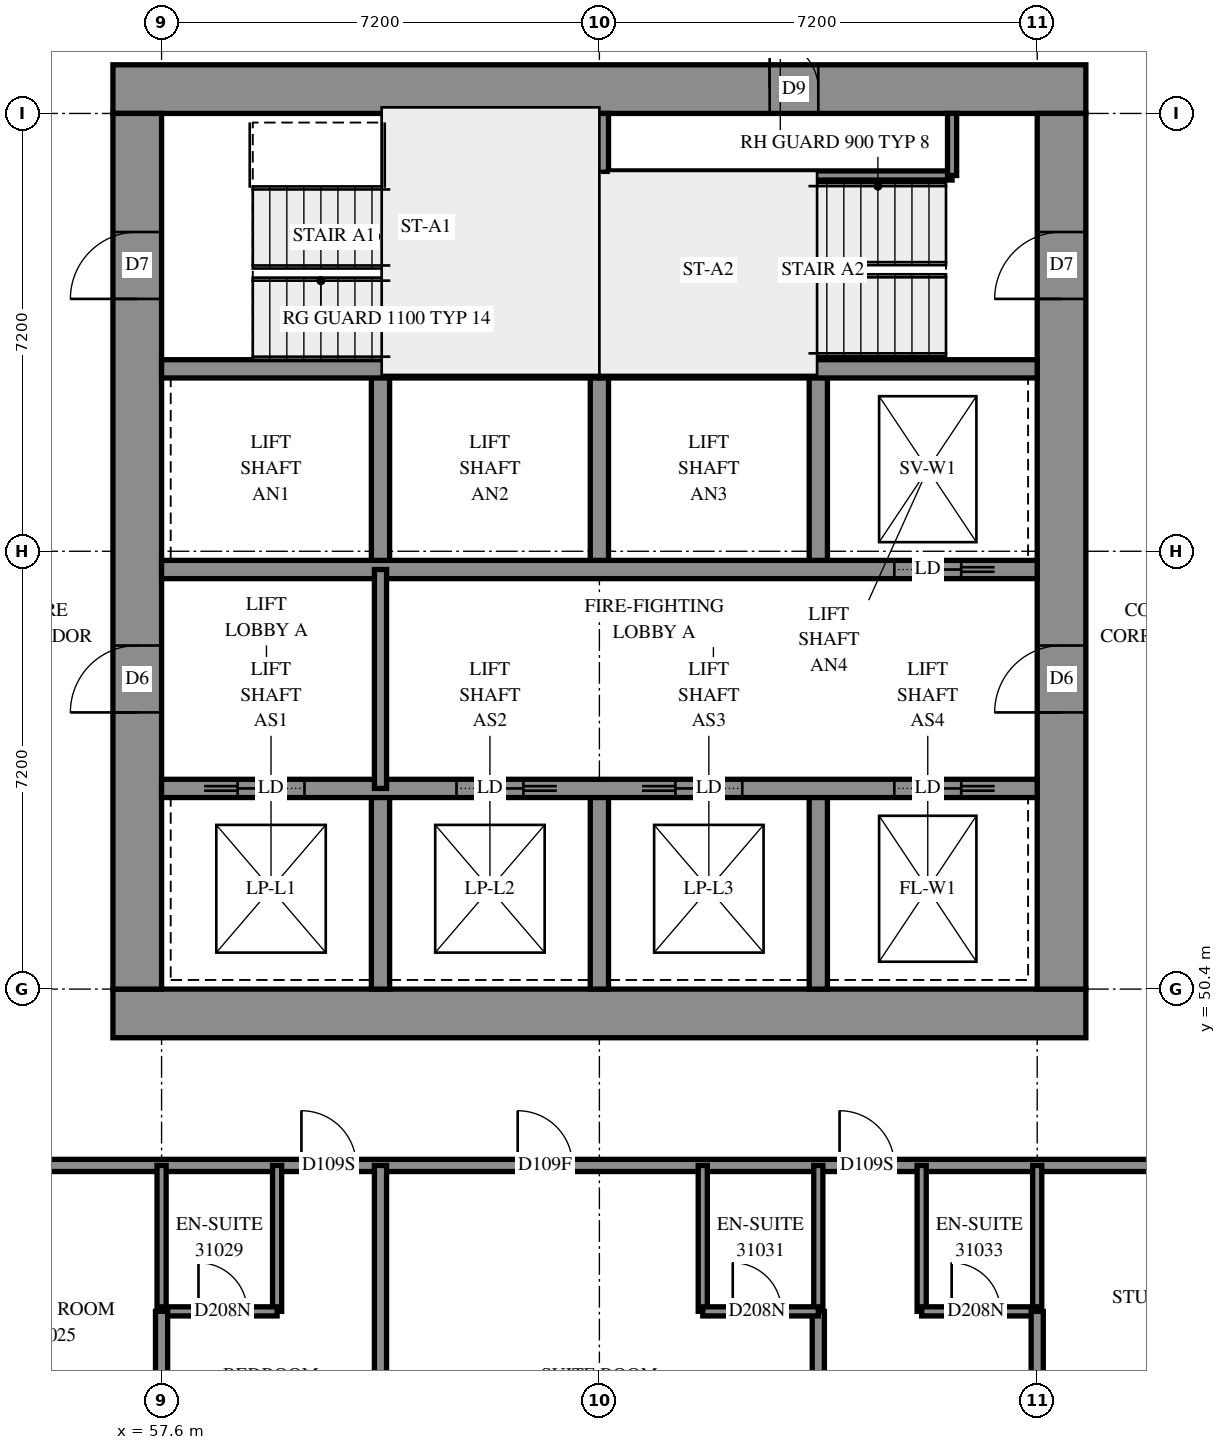
"""IFC4 building model, lengths in metres.
Left out: names, types, materials, properties, quantities, classifications, styles, units other than length and angle.
Written with IfcOpenShell. Run it as: python <this file> out.ifc"""

import sys

from ifc_helpers import new_model, si_unit, direction, frame, frame_2d, origin, place, context, subcontext, project, spatial, rectangle, extrude, element, fill, save


model = new_model("IFC4")
c1 = context("Model", 3, precision=1e-05, world=origin(), true_north=direction((0.0, 1.0)))
c2 = subcontext(c1, "Body", "Model", "MODEL_VIEW")
j1 = project(units=[si_unit("LENGTHUNIT", "METRE"), si_unit("PLANEANGLEUNIT", "RADIAN")], contexts=[c1])
p1 = place(None, origin())
s1 = spatial("IfcSite", under=j1, at=p1, CompositionType="ELEMENT")
p2 = place(p1, origin())
s2 = spatial("IfcBuilding", under=s1, at=p2, CompositionType="ELEMENT")
p3 = place(p2, frame((0.0, 0.0, 115.2)))
s3 = spatial("IfcBuildingStorey", under=s2, at=p3, CompositionType="ELEMENT", Elevation=115.2)
p4 = place(p3, frame((56.8, 50.0, -0.3), z_axis=(0.0, 0.0, 1.0), x_axis=(1.0, 0.0, 0.0)))
e1 = element("IfcWall", 1, at=p4, inside=s3, PredefinedType="SHEAR", context=c2, shape_type="SweptSolid", body=[
    extrude(rectangle(XDim=16.0, YDim=0.8, at=frame_2d((8.0, 0.0))), origin(), (0.0, 0.0, 1.0), 2.7),
])
p5 = place(p3, frame((56.8, 65.2, -0.3), z_axis=(0.0, 0.0, 1.0), x_axis=(1.0, 0.0, 0.0)))
e2 = element("IfcWall", 2, at=p5, inside=s3, PredefinedType="SHEAR", context=c2, shape_type="SweptSolid", body=[
    extrude(rectangle(XDim=16.0, YDim=0.8, at=frame_2d((8.0, 0.0))), origin(), (0.0, 0.0, 1.0), 2.7),
])
p6 = place(p5, frame((10.8, 0.0, 0.3)))
e3 = element("IfcOpeningElement", 3, at=p6, cuts=e2, PredefinedType="OPENING", context=c2, shape_type="SweptSolid", body=[
    extrude(rectangle(XDim=0.8, YDim=2.1, at=frame_2d((0.4, 1.05))), frame((0.0, 0.41, 0.0), z_axis=(0.0, -1.0, 0.0), x_axis=(1.0, 0.0, 0.0)), (0.0, 0.0, 1.0), 0.82),
])
p7 = place(p3, frame((57.2, 50.4, -0.3), z_axis=(0.0, 0.0, 1.0), x_axis=(0.0, 1.0, 0.0)))
e4 = element("IfcWall", 4, at=p7, inside=s3, PredefinedType="SHEAR", context=c2, shape_type="SweptSolid", body=[
    extrude(rectangle(XDim=14.4, YDim=0.8, at=frame_2d((7.2, 0.0))), origin(), (0.0, 0.0, 1.0), 2.7),
])
p8 = place(p7, frame((4.55, 0.0, 0.3)))
e5 = element("IfcOpeningElement", 5, at=p8, cuts=e4, PredefinedType="OPENING", context=c2, shape_type="SweptSolid", body=[
    extrude(rectangle(XDim=1.1, YDim=2.1, at=frame_2d((0.55, 1.05))), frame((0.0, 0.41, 0.0), z_axis=(0.0, -1.0, 0.0), x_axis=(1.0, 0.0, 0.0)), (0.0, 0.0, 1.0), 0.82),
])
p9 = place(p7, frame((11.35, 0.0, 0.3)))
e6 = element("IfcOpeningElement", 6, at=p9, cuts=e4, PredefinedType="OPENING", context=c2, shape_type="SweptSolid", body=[
    extrude(rectangle(XDim=1.1, YDim=2.1, at=frame_2d((0.55, 1.05))), frame((0.0, 0.41, 0.0), z_axis=(0.0, -1.0, 0.0), x_axis=(1.0, 0.0, 0.0)), (0.0, 0.0, 1.0), 0.82),
])
p10 = place(p3, frame((72.4, 50.4, -0.3), z_axis=(0.0, 0.0, 1.0), x_axis=(0.0, 1.0, 0.0)))
e7 = element("IfcWall", 7, at=p10, inside=s3, PredefinedType="SHEAR", context=c2, shape_type="SweptSolid", body=[
    extrude(rectangle(XDim=14.4, YDim=0.8, at=frame_2d((7.2, 0.0))), origin(), (0.0, 0.0, 1.0), 2.7),
])
p11 = place(p10, frame((4.55, 0.0, 0.3)))
e8 = element("IfcOpeningElement", 8, at=p11, cuts=e7, PredefinedType="OPENING", context=c2, shape_type="SweptSolid", body=[
    extrude(rectangle(XDim=1.1, YDim=2.1, at=frame_2d((0.55, 1.05))), frame((0.0, 0.41, 0.0), z_axis=(0.0, -1.0, 0.0), x_axis=(1.0, 0.0, 0.0)), (0.0, 0.0, 1.0), 0.82),
])
p12 = place(p10, frame((11.35, 0.0, 0.3)))
e9 = element("IfcOpeningElement", 9, at=p12, cuts=e7, PredefinedType="OPENING", context=c2, shape_type="SweptSolid", body=[
    extrude(rectangle(XDim=1.1, YDim=2.1, at=frame_2d((0.55, 1.05))), frame((0.0, 0.41, 0.0), z_axis=(0.0, -1.0, 0.0), x_axis=(1.0, 0.0, 0.0)), (0.0, 0.0, 1.0), 0.82),
])
for number, where, z_axis, x_axis in (
    (10, (61.2, 50.4, 0.0), (0.0, 0.0, 1.0), (0.0, 1.0, 0.0)),
    (11, (61.2, 57.3, 0.0), (0.0, 0.0, 1.0), (0.0, 1.0, 0.0)),
    (12, (64.8, 50.4, 0.0), (0.0, 0.0, 1.0), (0.0, 1.0, 0.0)),
    (13, (64.8, 57.3, 0.0), (0.0, 0.0, 1.0), (0.0, 1.0, 0.0)),
    (14, (68.4, 50.4, 0.0), (0.0, 0.0, 1.0), (0.0, 1.0, 0.0)),
    (15, (68.4, 57.3, 0.0), (0.0, 0.0, 1.0), (0.0, 1.0, 0.0)),
):
    element("IfcWall", number, at=place(p3, frame(where, z_axis=z_axis, x_axis=x_axis)), inside=s3, PredefinedType="SOLIDWALL", context=c2, shape_type="SweptSolid", body=[
        extrude(rectangle(XDim=3.3, YDim=0.3, at=frame_2d((1.65, 0.0))), origin(), (0.0, 0.0, 1.0), 3.1),
    ])
p13 = place(p3, frame((57.6, 53.7, 0.0), z_axis=(0.0, 0.0, 1.0), x_axis=(1.0, 0.0, 0.0)))
e16 = element("IfcWall", 16, at=p13, inside=s3, PredefinedType="SOLIDWALL", context=c2, shape_type="SweptSolid", body=[
    extrude(rectangle(XDim=14.4, YDim=0.3, at=frame_2d((7.2, 0.0))), origin(), (0.0, 0.0, 1.0), 3.1),
])
p14 = place(p13, frame((1.25, 0.0, 0.0)))
e17 = element("IfcOpeningElement", 17, at=p14, cuts=e16, PredefinedType="OPENING", context=c2, shape_type="SweptSolid", body=[
    extrude(rectangle(XDim=1.1, YDim=2.1, at=frame_2d((0.55, 1.05))), frame((0.0, 0.16, 0.0), z_axis=(0.0, -1.0, 0.0), x_axis=(1.0, 0.0, 0.0)), (0.0, 0.0, 1.0), 0.32),
])
p15 = place(p13, frame((4.85, 0.0, 0.0)))
e18 = element("IfcOpeningElement", 18, at=p15, cuts=e16, PredefinedType="OPENING", context=c2, shape_type="SweptSolid", body=[
    extrude(rectangle(XDim=1.1, YDim=2.1, at=frame_2d((0.55, 1.05))), frame((0.0, 0.16, 0.0), z_axis=(0.0, -1.0, 0.0), x_axis=(1.0, 0.0, 0.0)), (0.0, 0.0, 1.0), 0.32),
])
p16 = place(p13, frame((8.45, 0.0, 0.0)))
e19 = element("IfcOpeningElement", 19, at=p16, cuts=e16, PredefinedType="OPENING", context=c2, shape_type="SweptSolid", body=[
    extrude(rectangle(XDim=1.1, YDim=2.1, at=frame_2d((0.55, 1.05))), frame((0.0, 0.16, 0.0), z_axis=(0.0, -1.0, 0.0), x_axis=(1.0, 0.0, 0.0)), (0.0, 0.0, 1.0), 0.32),
])
p17 = place(p13, frame((12.05, 0.0, 0.0)))
e20 = element("IfcOpeningElement", 20, at=p17, cuts=e16, PredefinedType="OPENING", context=c2, shape_type="SweptSolid", body=[
    extrude(rectangle(XDim=1.1, YDim=2.1, at=frame_2d((0.55, 1.05))), frame((0.0, 0.16, 0.0), z_axis=(0.0, -1.0, 0.0), x_axis=(1.0, 0.0, 0.0)), (0.0, 0.0, 1.0), 0.32),
])
p18 = place(p3, frame((57.6, 57.3, 0.0), z_axis=(0.0, 0.0, 1.0), x_axis=(1.0, 0.0, 0.0)))
e21 = element("IfcWall", 21, at=p18, inside=s3, PredefinedType="SOLIDWALL", context=c2, shape_type="SweptSolid", body=[
    extrude(rectangle(XDim=14.4, YDim=0.3, at=frame_2d((7.2, 0.0))), origin(), (0.0, 0.0, 1.0), 3.1),
])
p19 = place(p18, frame((12.05, 0.0, 0.0)))
e22 = element("IfcOpeningElement", 22, at=p19, cuts=e21, PredefinedType="OPENING", context=c2, shape_type="SweptSolid", body=[
    extrude(rectangle(XDim=1.1, YDim=2.1, at=frame_2d((0.55, 1.05))), frame((0.0, 0.16, 0.0), z_axis=(0.0, -1.0, 0.0), x_axis=(1.0, 0.0, 0.0)), (0.0, 0.0, 1.0), 0.32),
])
for number, where, z_axis, x_axis in (
    (23, (57.6, 60.6, 0.0), (0.0, 0.0, 1.0), (1.0, 0.0, 0.0)),
    (24, (64.8, 60.6, 0.0), (0.0, 0.0, 1.0), (1.0, 0.0, 0.0)),
):
    element("IfcWall", number, at=place(p3, frame(where, z_axis=z_axis, x_axis=x_axis)), inside=s3, PredefinedType="SOLIDWALL", context=c2, shape_type="SweptSolid", body=[
        extrude(rectangle(XDim=7.2, YDim=0.3, at=frame_2d((3.6, 0.0))), origin(), (0.0, 0.0, 1.0), 3.1),
    ])
p20 = place(p3, frame((64.8, 60.6, 0.0), z_axis=(0.0, 0.0, 1.0), x_axis=(0.0, 1.0, 0.0)))
e25 = element("IfcWall", 25, at=p20, inside=s3, PredefinedType="SOLIDWALL", context=c2, shape_type="SweptSolid", body=[
    extrude(rectangle(XDim=4.2, YDim=0.3, at=frame_2d((2.1, 0.0))), origin(), (0.0, 0.0, 1.0), 3.1),
])
p21 = place(p3, frame((64.95, 63.78, 0.0), z_axis=(0.0, 0.0, 1.0), x_axis=(1.0, 0.0, 0.0)))
e26 = element("IfcWall", 26, at=p21, inside=s3, PredefinedType="PARTITIONING", context=c2, shape_type="SweptSolid", body=[
    extrude(rectangle(XDim=5.65, YDim=0.15, at=frame_2d((2.825, 0.0))), origin(), (0.0, 0.0, 1.0), 3.1),
])
p22 = place(p3, frame((70.6, 63.78, 0.0), z_axis=(0.0, 0.0, 1.0), x_axis=(0.0, 1.0, 0.0)))
e27 = element("IfcWall", 27, at=p22, inside=s3, PredefinedType="PARTITIONING", context=c2, shape_type="SweptSolid", body=[
    extrude(rectangle(XDim=1.02, YDim=0.15, at=frame_2d((0.51, 0.0))), origin(), (0.0, 0.0, 1.0), 3.1),
])
p23 = place(p3, frame((61.2, 53.7, 0.0), z_axis=(0.0, 0.0, 1.0), x_axis=(0.0, 1.0, 0.0)))
e28 = element("IfcWall", 28, at=p23, inside=s3, PredefinedType="PARTITIONING", context=c2, shape_type="SweptSolid", body=[
    extrude(rectangle(XDim=3.6, YDim=0.2, at=frame_2d((1.8, 0.0))), origin(), (0.0, 0.0, 1.0), 3.1),
])
p24 = place(p3, frame((54.7, 47.5, 0.0), z_axis=(0.0, 0.0, 1.0), x_axis=(1.0, 0.0, 0.0)))
e29 = element("IfcWall", 29, at=p24, inside=s3, PredefinedType="PARTITIONING", context=c2, shape_type="SweptSolid", body=[
    extrude(rectangle(XDim=19.442, YDim=0.2, at=frame_2d((9.721, 0.0))), origin(), (0.0, 0.0, 1.0), 3.1),
])
p25 = place(p24, frame((5.2, 0.0, 0.0)))
e30 = element("IfcOpeningElement", 30, at=p25, cuts=e29, PredefinedType="OPENING", context=c2, shape_type="SweptSolid", body=[
    extrude(rectangle(XDim=0.9, YDim=2.1, at=frame_2d((0.45, 1.05))), frame((0.0, 0.11, 0.0), z_axis=(0.0, -1.0, 0.0), x_axis=(1.0, 0.0, 0.0)), (0.0, 0.0, 1.0), 0.22),
])
p26 = place(p24, frame((8.757, 0.0, 0.0)))
e31 = element("IfcOpeningElement", 31, at=p26, cuts=e29, PredefinedType="OPENING", context=c2, shape_type="SweptSolid", body=[
    extrude(rectangle(XDim=0.9, YDim=2.1, at=frame_2d((0.45, 1.05))), frame((0.0, 0.11, 0.0), z_axis=(0.0, -1.0, 0.0), x_axis=(1.0, 0.0, 0.0)), (0.0, 0.0, 1.0), 0.22),
])
p27 = place(p24, frame((14.05, 0.0, 0.0)))
e32 = element("IfcOpeningElement", 32, at=p27, cuts=e29, PredefinedType="OPENING", context=c2, shape_type="SweptSolid", body=[
    extrude(rectangle(XDim=0.9, YDim=2.1, at=frame_2d((0.45, 1.05))), frame((0.0, 0.11, 0.0), z_axis=(0.0, -1.0, 0.0), x_axis=(1.0, 0.0, 0.0)), (0.0, 0.0, 1.0), 0.22),
])
p28 = place(p3, frame((61.2, 42.244, 0.0), z_axis=(0.0, 0.0, 1.0), x_axis=(0.0, 1.0, 0.0)))
e33 = element("IfcWall", 33, at=p28, inside=s3, PredefinedType="PARTITIONING", context=c2, shape_type="SweptSolid", body=[
    extrude(rectangle(XDim=5.256, YDim=0.2, at=frame_2d((2.628, 0.0))), origin(), (0.0, 0.0, 1.0), 3.1),
])
p29 = place(p3, frame((68.4, 42.176, 0.0), z_axis=(0.0, 0.0, 1.0), x_axis=(0.0, 1.0, 0.0)))
e34 = element("IfcWall", 34, at=p29, inside=s3, PredefinedType="PARTITIONING", context=c2, shape_type="SweptSolid", body=[
    extrude(rectangle(XDim=2.924, YDim=0.2, at=frame_2d((1.462, 0.0))), origin(), (0.0, 0.0, 1.0), 3.1),
])
for number, where, z_axis, x_axis in (
    (35, (59.5, 45.1, 0.0), (0.0, 0.0, 1.0), (0.0, 1.0, 0.0)),
    (36, (57.6, 45.1, 0.0), (0.0, 0.0, 1.0), (0.0, 1.0, 0.0)),
    (37, (66.5, 45.1, 0.0), (0.0, 0.0, 1.0), (0.0, 1.0, 0.0)),
    (38, (68.4, 45.1, 0.0), (0.0, 0.0, 1.0), (0.0, 1.0, 0.0)),
    (39, (70.1, 45.1, 0.0), (0.0, 0.0, 1.0), (0.0, 1.0, 0.0)),
    (40, (72.0, 45.1, 0.0), (0.0, 0.0, 1.0), (0.0, 1.0, 0.0)),
):
    element("IfcWall", number, at=place(p3, frame(where, z_axis=z_axis, x_axis=x_axis)), inside=s3, PredefinedType="PARTITIONING", context=c2, shape_type="SweptSolid", body=[
        extrude(rectangle(XDim=2.4, YDim=0.15, at=frame_2d((1.2, 0.0))), origin(), (0.0, 0.0, 1.0), 3.1),
    ])
p30 = place(p3, frame((66.5, 45.1, 0.0), z_axis=(0.0, 0.0, 1.0), x_axis=(1.0, 0.0, 0.0)))
e41 = element("IfcWall", 41, at=p30, inside=s3, PredefinedType="PARTITIONING", context=c2, shape_type="SweptSolid", body=[
    extrude(rectangle(XDim=1.9, YDim=0.15, at=frame_2d((0.95, 0.0))), origin(), (0.0, 0.0, 1.0), 3.1),
])
p31 = place(p30, frame((0.493, 0.0, 0.0)))
e42 = element("IfcOpeningElement", 42, at=p31, cuts=e41, PredefinedType="OPENING", context=c2, shape_type="SweptSolid", body=[
    extrude(rectangle(XDim=0.8, YDim=2.1, at=frame_2d((0.4, 1.05))), frame((0.0, 0.085, 0.0), z_axis=(0.0, -1.0, 0.0), x_axis=(1.0, 0.0, 0.0)), (0.0, 0.0, 1.0), 0.17),
])
p32 = place(p3, frame((70.1, 45.1, 0.0), z_axis=(0.0, 0.0, 1.0), x_axis=(1.0, 0.0, 0.0)))
e43 = element("IfcWall", 43, at=p32, inside=s3, PredefinedType="PARTITIONING", context=c2, shape_type="SweptSolid", body=[
    extrude(rectangle(XDim=1.9, YDim=0.15, at=frame_2d((0.95, 0.0))), origin(), (0.0, 0.0, 1.0), 3.1),
])
p33 = place(p32, frame((0.493, 0.0, 0.0)))
e44 = element("IfcOpeningElement", 44, at=p33, cuts=e43, PredefinedType="OPENING", context=c2, shape_type="SweptSolid", body=[
    extrude(rectangle(XDim=0.8, YDim=2.1, at=frame_2d((0.4, 1.05))), frame((0.0, 0.085, 0.0), z_axis=(0.0, -1.0, 0.0), x_axis=(1.0, 0.0, 0.0)), (0.0, 0.0, 1.0), 0.17),
])
p34 = place(p3, frame((57.6, 45.1, 0.0), z_axis=(0.0, 0.0, 1.0), x_axis=(1.0, 0.0, 0.0)))
e45 = element("IfcWall", 45, at=p34, inside=s3, PredefinedType="PARTITIONING", context=c2, shape_type="SweptSolid", body=[
    extrude(rectangle(XDim=1.9, YDim=0.15, at=frame_2d((0.95, 0.0))), origin(), (0.0, 0.0, 1.0), 3.1),
])
p35 = place(p34, frame((0.607, 0.0, 0.0)))
e46 = element("IfcOpeningElement", 46, at=p35, cuts=e45, PredefinedType="OPENING", context=c2, shape_type="SweptSolid", body=[
    extrude(rectangle(XDim=0.8, YDim=2.1, at=frame_2d((0.4, 1.05))), frame((0.0, 0.085, 0.0), z_axis=(0.0, -1.0, 0.0), x_axis=(1.0, 0.0, 0.0)), (0.0, 0.0, 1.0), 0.17),
])
for number, where, z_axis, x_axis in (
    (47, (57.6, 43.7, 0.0), (0.0, 0.0, 1.0), (0.0, 1.0, 0.0)),
    (48, (72.0, 43.7, 0.0), (0.0, 0.0, 1.0), (0.0, 1.0, 0.0)),
):
    element("IfcWall", number, at=place(p3, frame(where, z_axis=z_axis, x_axis=x_axis)), inside=s3, PredefinedType="PARTITIONING", context=c2, shape_type="SweptSolid", body=[
        extrude(rectangle(XDim=1.4, YDim=0.2, at=frame_2d((0.7, 0.0))), origin(), (0.0, 0.0, 1.0), 3.1),
    ])
p36 = place(p6, origin())
e49 = element("IfcDoor", 49, at=p36, inside=s3, OperationType="SINGLE_SWING_RIGHT", PredefinedType="DOOR", context=c2, shape_type="SweptSolid", body=[
    extrude(rectangle(XDim=0.8, YDim=2.1, at=frame_2d((0.4, 1.05))), frame((0.0, -0.34, 0.0), z_axis=(0.0, -1.0, 0.0), x_axis=(1.0, 0.0, 0.0)), (0.0, 0.0, 1.0), 0.05),
])
fill(e3, e49)
p37 = place(p8, origin())
e50 = element("IfcDoor", 50, at=p37, inside=s3, OperationType="DOUBLE_DOOR_SINGLE_SWING", PredefinedType="DOOR", context=c2, shape_type="SweptSolid", body=[
    extrude(rectangle(XDim=1.1, YDim=2.1, at=frame_2d((0.55, 1.05))), frame((0.0, 0.025, 0.0), z_axis=(0.0, -1.0, 0.0), x_axis=(1.0, 0.0, 0.0)), (0.0, 0.0, 1.0), 0.05),
])
fill(e5, e50)
p38 = place(p11, origin())
e51 = element("IfcDoor", 51, at=p38, inside=s3, OperationType="DOUBLE_DOOR_SINGLE_SWING", PredefinedType="DOOR", context=c2, shape_type="SweptSolid", body=[
    extrude(rectangle(XDim=1.1, YDim=2.1, at=frame_2d((0.55, 1.05))), frame((0.0, 0.025, 0.0), z_axis=(0.0, -1.0, 0.0), x_axis=(1.0, 0.0, 0.0)), (0.0, 0.0, 1.0), 0.05),
])
fill(e8, e51)
p39 = place(p9, origin())
e52 = element("IfcDoor", 52, at=p39, inside=s3, OperationType="SINGLE_SWING_LEFT", PredefinedType="DOOR", context=c2, shape_type="SweptSolid", body=[
    extrude(rectangle(XDim=1.1, YDim=2.1, at=frame_2d((0.55, 1.05))), frame((0.0, 0.025, 0.0), z_axis=(0.0, -1.0, 0.0), x_axis=(1.0, 0.0, 0.0)), (0.0, 0.0, 1.0), 0.05),
])
fill(e6, e52)
p40 = place(p12, origin())
e53 = element("IfcDoor", 53, at=p40, inside=s3, OperationType="SINGLE_SWING_RIGHT", PredefinedType="DOOR", context=c2, shape_type="SweptSolid", body=[
    extrude(rectangle(XDim=1.1, YDim=2.1, at=frame_2d((0.55, 1.05))), frame((0.0, 0.025, 0.0), z_axis=(0.0, -1.0, 0.0), x_axis=(1.0, 0.0, 0.0)), (0.0, 0.0, 1.0), 0.05),
])
fill(e9, e53)
p41 = place(p14, origin())
e54 = element("IfcDoor", 54, at=p41, inside=s3, OperationType="SLIDING_TO_LEFT", PredefinedType="DOOR", context=c2, shape_type="SweptSolid", body=[
    extrude(rectangle(XDim=1.1, YDim=2.1, at=frame_2d((0.55, 1.05))), frame((0.0, 0.025, 0.0), z_axis=(0.0, -1.0, 0.0), x_axis=(1.0, 0.0, 0.0)), (0.0, 0.0, 1.0), 0.05),
])
fill(e17, e54)
p42 = place(p15, origin())
e55 = element("IfcDoor", 55, at=p42, inside=s3, OperationType="SLIDING_TO_RIGHT", PredefinedType="DOOR", context=c2, shape_type="SweptSolid", body=[
    extrude(rectangle(XDim=1.1, YDim=2.1, at=frame_2d((0.55, 1.05))), frame((0.0, 0.025, 0.0), z_axis=(0.0, -1.0, 0.0), x_axis=(1.0, 0.0, 0.0)), (0.0, 0.0, 1.0), 0.05),
])
fill(e18, e55)
p43 = place(p16, origin())
e56 = element("IfcDoor", 56, at=p43, inside=s3, OperationType="SLIDING_TO_LEFT", PredefinedType="DOOR", context=c2, shape_type="SweptSolid", body=[
    extrude(rectangle(XDim=1.1, YDim=2.1, at=frame_2d((0.55, 1.05))), frame((0.0, 0.025, 0.0), z_axis=(0.0, -1.0, 0.0), x_axis=(1.0, 0.0, 0.0)), (0.0, 0.0, 1.0), 0.05),
])
fill(e19, e56)
p44 = place(p17, origin())
e57 = element("IfcDoor", 57, at=p44, inside=s3, OperationType="SLIDING_TO_RIGHT", PredefinedType="DOOR", context=c2, shape_type="SweptSolid", body=[
    extrude(rectangle(XDim=1.1, YDim=2.1, at=frame_2d((0.55, 1.05))), frame((0.0, 0.025, 0.0), z_axis=(0.0, -1.0, 0.0), x_axis=(1.0, 0.0, 0.0)), (0.0, 0.0, 1.0), 0.05),
])
fill(e20, e57)
p45 = place(p19, origin())
e58 = element("IfcDoor", 58, at=p45, inside=s3, OperationType="SLIDING_TO_RIGHT", PredefinedType="DOOR", context=c2, shape_type="SweptSolid", body=[
    extrude(rectangle(XDim=1.1, YDim=2.1, at=frame_2d((0.55, 1.05))), frame((0.0, 0.025, 0.0), z_axis=(0.0, -1.0, 0.0), x_axis=(1.0, 0.0, 0.0)), (0.0, 0.0, 1.0), 0.05),
])
fill(e22, e58)
p46 = place(p25, origin())
e59 = element("IfcDoor", 59, at=p46, inside=s3, OperationType="SINGLE_SWING_LEFT", PredefinedType="DOOR", context=c2, shape_type="SweptSolid", body=[
    extrude(rectangle(XDim=0.9, YDim=2.1, at=frame_2d((0.45, 1.05))), frame((0.0, 0.025, 0.0), z_axis=(0.0, -1.0, 0.0), x_axis=(1.0, 0.0, 0.0)), (0.0, 0.0, 1.0), 0.05),
])
fill(e30, e59)
p47 = place(p35, origin())
e60 = element("IfcDoor", 60, at=p47, inside=s3, OperationType="SINGLE_SWING_RIGHT", PredefinedType="DOOR", context=c2, shape_type="SweptSolid", body=[
    extrude(rectangle(XDim=0.8, YDim=2.1, at=frame_2d((0.4, 1.05))), frame((0.0, 0.025, 0.0), z_axis=(0.0, -1.0, 0.0), x_axis=(1.0, 0.0, 0.0)), (0.0, 0.0, 1.0), 0.05),
])
fill(e46, e60)
p48 = place(p26, origin())
e61 = element("IfcDoor", 61, at=p48, inside=s3, OperationType="SINGLE_SWING_RIGHT", PredefinedType="DOOR", context=c2, shape_type="SweptSolid", body=[
    extrude(rectangle(XDim=0.9, YDim=2.1, at=frame_2d((0.45, 1.05))), frame((0.0, 0.025, 0.0), z_axis=(0.0, -1.0, 0.0), x_axis=(1.0, 0.0, 0.0)), (0.0, 0.0, 1.0), 0.05),
])
fill(e31, e61)
p49 = place(p31, origin())
e62 = element("IfcDoor", 62, at=p49, inside=s3, OperationType="SINGLE_SWING_RIGHT", PredefinedType="DOOR", context=c2, shape_type="SweptSolid", body=[
    extrude(rectangle(XDim=0.8, YDim=2.1, at=frame_2d((0.4, 1.05))), frame((0.0, 0.025, 0.0), z_axis=(0.0, -1.0, 0.0), x_axis=(1.0, 0.0, 0.0)), (0.0, 0.0, 1.0), 0.05),
])
fill(e42, e62)
p50 = place(p27, origin())
e63 = element("IfcDoor", 63, at=p50, inside=s3, OperationType="SINGLE_SWING_RIGHT", PredefinedType="DOOR", context=c2, shape_type="SweptSolid", body=[
    extrude(rectangle(XDim=0.9, YDim=2.1, at=frame_2d((0.45, 1.05))), frame((0.0, 0.025, 0.0), z_axis=(0.0, -1.0, 0.0), x_axis=(1.0, 0.0, 0.0)), (0.0, 0.0, 1.0), 0.05),
])
fill(e32, e63)
p51 = place(p33, origin())
e64 = element("IfcDoor", 64, at=p51, inside=s3, OperationType="SINGLE_SWING_RIGHT", PredefinedType="DOOR", context=c2, shape_type="SweptSolid", body=[
    extrude(rectangle(XDim=0.8, YDim=2.1, at=frame_2d((0.4, 1.05))), frame((0.0, 0.025, 0.0), z_axis=(0.0, -1.0, 0.0), x_axis=(1.0, 0.0, 0.0)), (0.0, 0.0, 1.0), 0.05),
])
fill(e44, e64)
save(model, sys.argv[1])
